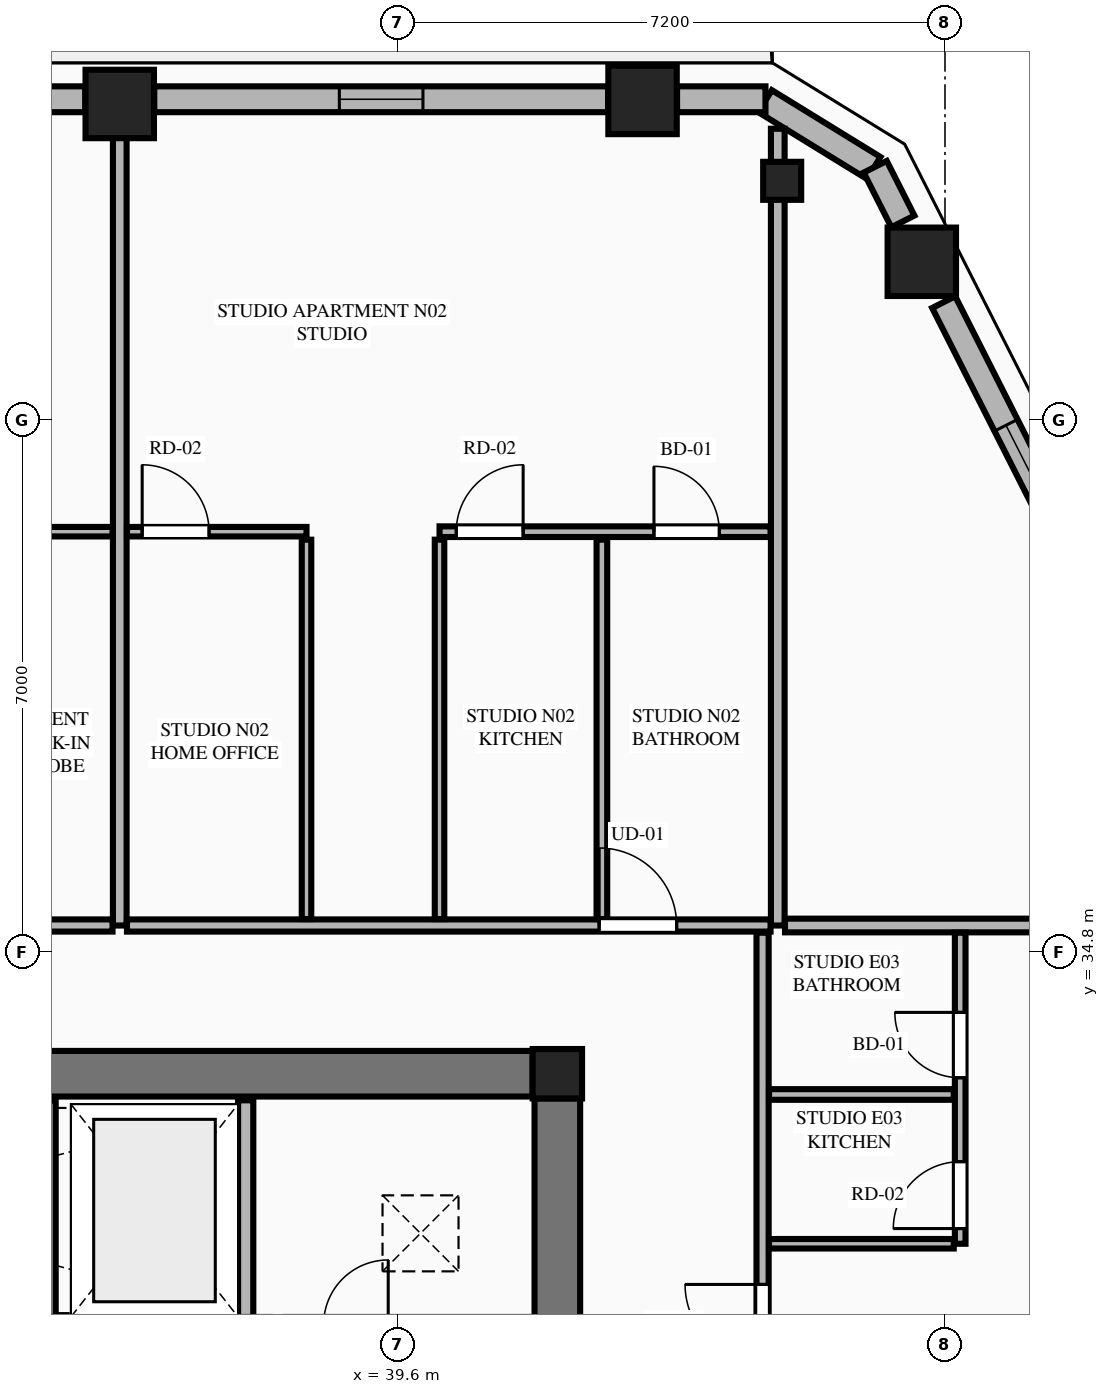
"""IFC4 building model, lengths in metres.
Left out: names, types, materials, properties, quantities, classifications, styles, units other than length and angle.
Written with IfcOpenShell. Run it as: python <this file> out.ifc"""

import sys

from ifc_helpers import new_model, si_unit, direction, frame, frame_2d, origin, origin_2d, place, context, subcontext, project, spatial, rectangle, extrude, element, fill, save


model = new_model("IFC4")
c1 = context("Model", 3, precision=1e-05, world=origin(), true_north=direction((0.0, 1.0)))
c2 = subcontext(c1, "Body", "Model", "MODEL_VIEW")
j1 = project(units=[si_unit("LENGTHUNIT", "METRE"), si_unit("PLANEANGLEUNIT", "RADIAN")], contexts=[c1])
p1 = place(None, origin())
s1 = spatial("IfcSite", under=j1, at=p1, CompositionType="ELEMENT")
p2 = place(p1, origin())
s2 = spatial("IfcBuilding", under=s1, at=p2, CompositionType="ELEMENT")
p3 = place(p2, frame((0.0, 0.0, 203.85)))
s3 = spatial("IfcBuildingStorey", under=s2, at=p3, CompositionType="ELEMENT", Elevation=203.85)
p4 = place(p3, frame((41.7, 33.2, 0.0), z_axis=(0.0, 0.0, 1.0), x_axis=(1.0, 0.0, 0.0)))
e1 = element("IfcColumn", 1, at=p4, inside=s3, PredefinedType="COLUMN", context=c2, shape_type="SweptSolid", body=[
    extrude(rectangle(XDim=0.65, YDim=0.65, at=origin_2d()), origin(), (0.0, 0.0, 1.0), 3.55),
])
p5 = place(p3, frame((23.425, 33.2, 0.0), z_axis=(0.0, 0.0, 1.0), x_axis=(1.0, 0.0, 0.0)))
e2 = element("IfcWall", 2, at=p5, inside=s3, PredefinedType="SHEAR", context=c2, shape_type="SweptSolid", body=[
    extrude(rectangle(XDim=17.95, YDim=0.6, at=frame_2d((8.975, 0.0))), origin(), (0.0, 0.0, 1.0), 3.35),
])
p6 = place(p3, frame((41.7, 18.925, 0.0), z_axis=(0.0, 0.0, 1.0), x_axis=(0.0, 1.0, 0.0)))
e3 = element("IfcWall", 3, at=p6, inside=s3, PredefinedType="SHEAR", context=c2, shape_type="SweptSolid", body=[
    extrude(rectangle(XDim=13.95, YDim=0.6, at=frame_2d((6.975, 0.0))), origin(), (0.0, 0.0, 1.0), 3.35),
])
p7 = place(p6, frame((2.915, 0.0, 0.0)))
e4 = element("IfcOpeningElement", 4, at=p7, cuts=e3, PredefinedType="OPENING", context=c2, shape_type="SweptSolid", body=[
    extrude(rectangle(XDim=1.22, YDim=2.25, at=frame_2d((0.61, 1.125))), frame((0.0, 0.31, 0.0), z_axis=(0.0, -1.0, 0.0), x_axis=(1.0, 0.0, 0.0)), (0.0, 0.0, 1.0), 0.62),
])
for number, where, z_axis, x_axis in (
    (5, (46.495, 43.882, 0.0), (0.0, 0.0, 1.0), (1.0, 0.0, 0.0)),
    (6, (42.821, 46.011, 0.0), (0.0, 0.0, 1.0), (1.0, 0.0, 0.0)),
    (7, (35.943, 45.958, 0.0), (0.0, 0.0, 1.0), (1.0, 0.0, 0.0)),
):
    element("IfcColumn", number, at=place(p3, frame(where, z_axis=z_axis, x_axis=x_axis)), inside=s3, PredefinedType="COLUMN", context=c2, shape_type="SweptSolid", body=[
        extrude(rectangle(XDim=0.9, YDim=0.9, at=origin_2d()), origin(), (0.0, 0.0, 1.0), 3.55),
    ])
p8 = place(p3, frame((44.658, 44.947, 0.0), z_axis=(0.0, 0.0, 1.0), x_axis=(-0.865230187018, 0.501374833306, 0.0)))
e8 = element("IfcColumn", 8, at=p8, inside=s3, PredefinedType="PILASTER", context=c2, shape_type="SweptSolid", body=[
    extrude(rectangle(XDim=0.5, YDim=0.35, at=origin_2d()), origin(), (0.0, 0.0, 1.0), 3.55),
])
for number, where, z_axis, x_axis in (
    (9, (35.0, 30.0, 0.0), (0.0, 0.0, 1.0), (0.0, 1.0, 0.0)),
    (10, (37.6, 30.0, 0.0), (0.0, 0.0, 1.0), (0.0, 1.0, 0.0)),
):
    element("IfcWall", number, at=place(p3, frame(where, z_axis=z_axis, x_axis=x_axis)), inside=s3, PredefinedType="PLUMBINGWALL", context=c2, shape_type="SweptSolid", body=[
        extrude(rectangle(XDim=2.85, YDim=0.2, at=frame_2d((1.425, 0.0))), origin(), (0.0, 0.0, 1.0), 3.35),
    ])
p9 = place(p3, frame((45.862, 45.116, 0.0), z_axis=(0.0, 0.0, 1.0), x_axis=(-0.851713271379, 0.524008113828, 0.0)))
e11 = element("IfcWall", 11, at=p9, inside=s3, PredefinedType="STANDARD", context=c2, shape_type="SweptSolid", body=[
    extrude(rectangle(XDim=1.678, YDim=0.34, at=frame_2d((0.839, 0.0))), origin(), (0.0, 0.0, 1.0), 3.35),
])
p10 = place(p3, frame((48.919, 39.13, 0.0), z_axis=(0.0, 0.0, 1.0), x_axis=(-0.45150207307, 0.892270070109, 0.0)))
e12 = element("IfcWall", 12, at=p10, inside=s3, PredefinedType="STANDARD", context=c2, shape_type="SweptSolid", body=[
    extrude(rectangle(XDim=4.731, YDim=0.34, at=frame_2d((2.365, 0.0))), origin(), (0.0, 0.0, 1.0), 2.883),
])
p11 = place(p10, frame((1.815, 0.0, 0.75)))
e13 = element("IfcOpeningElement", 13, at=p11, cuts=e12, PredefinedType="OPENING", context=c2, shape_type="SweptSolid", body=[
    extrude(rectangle(XDim=1.1, YDim=1.983, at=frame_2d((0.55, 0.991))), frame((0.0, 0.18, 0.0), z_axis=(0.0, -1.0, 0.0), x_axis=(1.0, 0.0, 0.0)), (0.0, 0.0, 1.0), 0.36),
])
p12 = place(p3, frame((46.246, 44.413, 0.0), z_axis=(0.0, 0.0, 1.0), x_axis=(-0.451691568309, 0.892174157392, 0.0)))
e14 = element("IfcWall", 14, at=p12, inside=s3, PredefinedType="STANDARD", context=c2, shape_type="SweptSolid", body=[
    extrude(rectangle(XDim=0.806, YDim=0.34, at=frame_2d((0.403, 0.0))), origin(), (0.0, 0.0, 1.0), 3.35),
])
p13 = place(p3, frame((44.438, 46.02, 0.0), z_axis=(0.0, 0.0, 1.0), x_axis=(-1.0, 0.0, 0.0)))
e15 = element("IfcWall", 15, at=p13, inside=s3, PredefinedType="STANDARD", context=c2, shape_type="SweptSolid", body=[
    extrude(rectangle(XDim=1.163, YDim=0.34, at=frame_2d((0.582, 0.0))), origin(), (0.0, 0.0, 1.0), 3.35),
])
p14 = place(p3, frame((42.367, 46.02, 0.0), z_axis=(0.0, 0.0, 1.0), x_axis=(-1.0, 0.0, 0.0)))
e16 = element("IfcWall", 16, at=p14, inside=s3, PredefinedType="STANDARD", context=c2, shape_type="SweptSolid", body=[
    extrude(rectangle(XDim=5.97, YDim=0.34, at=frame_2d((2.985, 0.0))), origin(), (0.0, 0.0, 1.0), 2.883),
])
p15 = place(p14, frame((2.435, 0.0, 0.75)))
e17 = element("IfcOpeningElement", 17, at=p15, cuts=e16, PredefinedType="OPENING", context=c2, shape_type="SweptSolid", body=[
    extrude(rectangle(XDim=1.1, YDim=1.983, at=frame_2d((0.55, 0.991))), frame((0.0, 0.18, 0.0), z_axis=(0.0, -1.0, 0.0), x_axis=(1.0, 0.0, 0.0)), (0.0, 0.0, 1.0), 0.36),
])
p16 = place(p3, frame((35.489, 46.02, 0.0), z_axis=(0.0, 0.0, 1.0), x_axis=(-1.0, 0.0, 0.0)))
e18 = element("IfcWall", 18, at=p16, inside=s3, PredefinedType="STANDARD", context=c2, shape_type="SweptSolid", body=[
    extrude(rectangle(XDim=6.178, YDim=0.34, at=frame_2d((3.089, 0.0))), origin(), (0.0, 0.0, 1.0), 2.883),
])
p17 = place(p16, frame((1.668, 0.0, 0.0)))
e19 = element("IfcOpeningElement", 19, at=p17, cuts=e18, PredefinedType="OPENING", context=c2, shape_type="SweptSolid", body=[
    extrude(rectangle(XDim=1.1, YDim=2.25, at=frame_2d((0.55, 1.125))), frame((0.0, 0.18, 0.0), z_axis=(0.0, -1.0, 0.0), x_axis=(1.0, 0.0, 0.0)), (0.0, 0.0, 1.0), 0.36),
])
p18 = place(p16, frame((4.872, 0.0, 0.75)))
e20 = element("IfcOpeningElement", 20, at=p18, cuts=e18, PredefinedType="OPENING", context=c2, shape_type="SweptSolid", body=[
    extrude(rectangle(XDim=1.086, YDim=1.983, at=frame_2d((0.543, 0.991))), frame((0.0, 0.18, 0.0), z_axis=(0.0, -1.0, 0.0), x_axis=(1.0, 0.0, 0.0)), (0.0, 0.0, 1.0), 0.36),
])
p19 = place(p3, frame((35.943, 35.15, 0.0), z_axis=(0.0, 0.0, 1.0), x_axis=(0.0, 1.0, 0.0)))
e21 = element("IfcWall", 21, at=p19, inside=s3, PredefinedType="PARTITIONING", context=c2, shape_type="SweptSolid", body=[
    extrude(rectangle(XDim=10.695, YDim=0.18, at=frame_2d((5.348, 0.0))), origin(), (0.0, 0.0, 1.0), 2.807),
])
p20 = place(p3, frame((44.6, 35.15, 0.0), z_axis=(0.0, 0.0, 1.0), x_axis=(0.0, 1.0, 0.0)))
e22 = element("IfcWall", 22, at=p20, inside=s3, PredefinedType="PARTITIONING", context=c2, shape_type="SweptSolid", body=[
    extrude(rectangle(XDim=10.482, YDim=0.18, at=frame_2d((5.241, 0.0))), origin(), (0.0, 0.0, 1.0), 3.35),
])
p21 = place(p3, frame((20.295, 35.15, 0.0), z_axis=(0.0, 0.0, 1.0), x_axis=(1.0, 0.0, 0.0)))
e23 = element("IfcWall", 23, at=p21, inside=s3, PredefinedType="PARTITIONING", context=c2, shape_type="SweptSolid", body=[
    extrude(rectangle(XDim=15.553, YDim=0.16, at=frame_2d((7.776, 0.0))), origin(), (0.0, 0.0, 1.0), 3.35),
])
p22 = place(p21, frame((0.405, 0.0, 0.0)))
e24 = element("IfcOpeningElement", 24, at=p22, cuts=e23, PredefinedType="OPENING", context=c2, shape_type="SweptSolid", body=[
    extrude(rectangle(XDim=1.02, YDim=2.25, at=frame_2d((0.51, 1.125))), frame((0.0, 0.09, 0.0), z_axis=(0.0, -1.0, 0.0), x_axis=(1.0, 0.0, 0.0)), (0.0, 0.0, 1.0), 0.18),
])
p23 = place(p3, frame((30.95, 40.331, 0.0), z_axis=(0.0, 0.0, 1.0), x_axis=(1.0, 0.0, 0.0)))
e25 = element("IfcWall", 25, at=p23, inside=s3, PredefinedType="PARTITIONING", context=c2, shape_type="SweptSolid", body=[
    extrude(rectangle(XDim=4.898, YDim=0.125, at=frame_2d((2.449, 0.0))), origin(), (0.0, 0.0, 1.0), 3.35),
])
p24 = place(p23, frame((0.28, 0.0, 0.0)))
e26 = element("IfcOpeningElement", 26, at=p24, cuts=e25, PredefinedType="OPENING", context=c2, shape_type="SweptSolid", body=[
    extrude(rectangle(XDim=0.86, YDim=2.1, at=frame_2d((0.43, 1.05))), frame((0.0, 0.073, 0.0), z_axis=(0.0, -1.0, 0.0), x_axis=(1.0, 0.0, 0.0)), (0.0, 0.0, 1.0), 0.145),
])
p25 = place(p23, frame((3.028, 0.0, 0.0)))
e27 = element("IfcOpeningElement", 27, at=p25, cuts=e25, PredefinedType="OPENING", context=c2, shape_type="SweptSolid", body=[
    extrude(rectangle(XDim=0.88, YDim=2.15, at=frame_2d((0.44, 1.075))), frame((0.0, 0.073, 0.0), z_axis=(0.0, -1.0, 0.0), x_axis=(1.0, 0.0, 0.0)), (0.0, 0.0, 1.0), 0.145),
])
p26 = place(p3, frame((36.038, 35.15, 0.0), z_axis=(0.0, 0.0, 1.0), x_axis=(1.0, 0.0, 0.0)))
e28 = element("IfcWall", 28, at=p26, inside=s3, PredefinedType="PARTITIONING", context=c2, shape_type="SweptSolid", body=[
    extrude(rectangle(XDim=8.467, YDim=0.16, at=frame_2d((4.233, 0.0))), origin(), (0.0, 0.0, 1.0), 3.35),
])
p27 = place(p26, frame((6.212, 0.0, 0.0)))
e29 = element("IfcOpeningElement", 29, at=p27, cuts=e28, PredefinedType="OPENING", context=c2, shape_type="SweptSolid", body=[
    extrude(rectangle(XDim=1.02, YDim=2.25, at=frame_2d((0.51, 1.125))), frame((0.0, 0.09, 0.0), z_axis=(0.0, -1.0, 0.0), x_axis=(1.0, 0.0, 0.0)), (0.0, 0.0, 1.0), 0.18),
])
p28 = place(p3, frame((40.15, 35.235, 0.0), z_axis=(0.0, 0.0, 1.0), x_axis=(0.0, 1.0, 0.0)))
e30 = element("IfcWall", 30, at=p28, inside=s3, PredefinedType="PARTITIONING", context=c2, shape_type="SweptSolid", body=[
    extrude(rectangle(XDim=4.991, YDim=0.125, at=frame_2d((2.496, 0.0))), origin(), (0.0, 0.0, 1.0), 3.35),
])
p29 = place(p3, frame((40.15, 40.331, 0.0), z_axis=(0.0, 0.0, 1.0), x_axis=(1.0, 0.0, 0.0)))
e31 = element("IfcWall", 31, at=p29, inside=s3, PredefinedType="PLUMBINGWALL", context=c2, shape_type="SweptSolid", body=[
    extrude(rectangle(XDim=4.355, YDim=0.14, at=frame_2d((2.177, 0.0))), origin(), (0.0, 0.0, 1.0), 3.35),
])
p30 = place(p29, frame((2.821, 0.0, 0.0)))
e32 = element("IfcOpeningElement", 32, at=p30, cuts=e31, PredefinedType="OPENING", context=c2, shape_type="SweptSolid", body=[
    extrude(rectangle(XDim=0.86, YDim=2.1, at=frame_2d((0.43, 1.05))), frame((0.0, 0.08, 0.0), z_axis=(0.0, -1.0, 0.0), x_axis=(1.0, 0.0, 0.0)), (0.0, 0.0, 1.0), 0.16),
])
p31 = place(p29, frame((0.22, 0.0, 0.0)))
e33 = element("IfcOpeningElement", 33, at=p31, cuts=e31, PredefinedType="OPENING", context=c2, shape_type="SweptSolid", body=[
    extrude(rectangle(XDim=0.88, YDim=2.15, at=frame_2d((0.44, 1.075))), frame((0.0, 0.08, 0.0), z_axis=(0.0, -1.0, 0.0), x_axis=(1.0, 0.0, 0.0)), (0.0, 0.0, 1.0), 0.16),
])
p32 = place(p3, frame((42.286, 35.235, 0.0), z_axis=(0.0, 0.0, 1.0), x_axis=(0.0, 1.0, 0.0)))
e34 = element("IfcWall", 34, at=p32, inside=s3, PredefinedType="PLUMBINGWALL", context=c2, shape_type="SweptSolid", body=[
    extrude(rectangle(XDim=4.991, YDim=0.14, at=frame_2d((2.496, 0.0))), origin(), (0.0, 0.0, 1.0), 2.807),
])
p33 = place(p3, frame((38.4, 35.235, 0.0), z_axis=(0.0, 0.0, 1.0), x_axis=(0.0, 1.0, 0.0)))
e35 = element("IfcWall", 35, at=p33, inside=s3, PredefinedType="PARTITIONING", context=c2, shape_type="SweptSolid", body=[
    extrude(rectangle(XDim=4.991, YDim=0.125, at=frame_2d((2.496, 0.0))), origin(), (0.0, 0.0, 1.0), 3.35),
])
p34 = place(p3, frame((36.038, 40.331, 0.0), z_axis=(0.0, 0.0, 1.0), x_axis=(1.0, 0.0, 0.0)))
e36 = element("IfcWall", 36, at=p34, inside=s3, PredefinedType="PARTITIONING", context=c2, shape_type="SweptSolid", body=[
    extrude(rectangle(XDim=2.362, YDim=0.125, at=frame_2d((1.181, 0.0))), origin(), (0.0, 0.0, 1.0), 3.35),
])
p35 = place(p34, frame((0.2, 0.0, 0.0)))
e37 = element("IfcOpeningElement", 37, at=p35, cuts=e36, PredefinedType="OPENING", context=c2, shape_type="SweptSolid", body=[
    extrude(rectangle(XDim=0.88, YDim=2.15, at=frame_2d((0.44, 1.075))), frame((0.0, 0.073, 0.0), z_axis=(0.0, -1.0, 0.0), x_axis=(1.0, 0.0, 0.0)), (0.0, 0.0, 1.0), 0.145),
])
p36 = place(p3, frame((44.695, 35.15, 0.0), z_axis=(0.0, 0.0, 1.0), x_axis=(1.0, 0.0, 0.0)))
e38 = element("IfcWall", 38, at=p36, inside=s3, PredefinedType="PARTITIONING", context=c2, shape_type="SweptSolid", body=[
    extrude(rectangle(XDim=5.995, YDim=0.18, at=frame_2d((2.998, 0.0))), origin(), (0.0, 0.0, 1.0), 3.35),
])
p37 = place(p3, frame((44.4, 29.008, 0.0), z_axis=(0.0, 0.0, 1.0), x_axis=(0.0, 1.0, 0.0)))
e39 = element("IfcWall", 39, at=p37, inside=s3, PredefinedType="PARTITIONING", context=c2, shape_type="SweptSolid", body=[
    extrude(rectangle(XDim=6.047, YDim=0.16, at=frame_2d((3.023, 0.0))), origin(), (0.0, 0.0, 1.0), 3.35),
])
p38 = place(p37, frame((0.4, 0.0, 0.0)))
e40 = element("IfcOpeningElement", 40, at=p38, cuts=e39, PredefinedType="OPENING", context=c2, shape_type="SweptSolid", body=[
    extrude(rectangle(XDim=1.02, YDim=2.25, at=frame_2d((0.51, 1.125))), frame((0.0, 0.09, 0.0), z_axis=(0.0, -1.0, 0.0), x_axis=(1.0, 0.0, 0.0)), (0.0, 0.0, 1.0), 0.18),
])
p39 = place(p3, frame((44.485, 30.963, 0.0), z_axis=(0.0, 0.0, 1.0), x_axis=(1.0, 0.0, 0.0)))
e41 = element("IfcWall", 41, at=p39, inside=s3, PredefinedType="PARTITIONING", context=c2, shape_type="SweptSolid", body=[
    extrude(rectangle(XDim=2.43, YDim=0.125, at=frame_2d((1.215, 0.0))), origin(), (0.0, 0.0, 1.0), 3.35),
])
p40 = place(p3, frame((47.0, 30.963, 0.0), z_axis=(0.0, 0.0, 1.0), x_axis=(0.0, 1.0, 0.0)))
e42 = element("IfcWall", 42, at=p40, inside=s3, PredefinedType="PLUMBINGWALL", context=c2, shape_type="SweptSolid", body=[
    extrude(rectangle(XDim=4.092, YDim=0.14, at=frame_2d((2.046, 0.0))), origin(), (0.0, 0.0, 1.0), 3.35),
])
p41 = place(p40, frame((2.184, 0.0, 0.0)))
e43 = element("IfcOpeningElement", 43, at=p41, cuts=e42, PredefinedType="OPENING", context=c2, shape_type="SweptSolid", body=[
    extrude(rectangle(XDim=0.86, YDim=2.1, at=frame_2d((0.43, 1.05))), frame((0.0, 0.08, 0.0), z_axis=(0.0, -1.0, 0.0), x_axis=(1.0, 0.0, 0.0)), (0.0, 0.0, 1.0), 0.16),
])
p42 = place(p40, frame((0.2, 0.0, 0.0)))
e44 = element("IfcOpeningElement", 44, at=p42, cuts=e42, PredefinedType="OPENING", context=c2, shape_type="SweptSolid", body=[
    extrude(rectangle(XDim=0.88, YDim=2.15, at=frame_2d((0.44, 1.075))), frame((0.0, 0.08, 0.0), z_axis=(0.0, -1.0, 0.0), x_axis=(1.0, 0.0, 0.0)), (0.0, 0.0, 1.0), 0.16),
])
p43 = place(p3, frame((44.485, 32.927, 0.0), z_axis=(0.0, 0.0, 1.0), x_axis=(1.0, 0.0, 0.0)))
e45 = element("IfcWall", 45, at=p43, inside=s3, PredefinedType="PLUMBINGWALL", context=c2, shape_type="SweptSolid", body=[
    extrude(rectangle(XDim=2.43, YDim=0.14, at=frame_2d((1.215, 0.0))), origin(), (0.0, 0.0, 1.0), 3.35),
])
p44 = place(p11, origin())
e46 = element("IfcWindow", 46, at=p44, inside=s3, PartitioningType="SINGLE_PANEL", PredefinedType="WINDOW", context=c2, shape_type="SweptSolid", body=[
    extrude(rectangle(XDim=1.1, YDim=1.983, at=frame_2d((0.55, 0.991))), frame((0.0, 0.03, 0.0), z_axis=(0.0, -1.0, 0.0), x_axis=(1.0, 0.0, 0.0)), (0.0, 0.0, 1.0), 0.06),
])
fill(e13, e46)
p45 = place(p15, origin())
e47 = element("IfcWindow", 47, at=p45, inside=s3, PartitioningType="SINGLE_PANEL", PredefinedType="WINDOW", context=c2, shape_type="SweptSolid", body=[
    extrude(rectangle(XDim=1.1, YDim=1.983, at=frame_2d((0.55, 0.991))), frame((0.0, 0.03, 0.0), z_axis=(0.0, -1.0, 0.0), x_axis=(1.0, 0.0, 0.0)), (0.0, 0.0, 1.0), 0.06),
])
fill(e17, e47)
p46 = place(p35, origin())
e48 = element("IfcDoor", 48, at=p46, inside=s3, OperationType="SINGLE_SWING_LEFT", PredefinedType="DOOR", context=c2, shape_type="SweptSolid", body=[
    extrude(rectangle(XDim=0.88, YDim=2.15, at=frame_2d((0.44, 1.075))), frame((0.0, 0.025, 0.0), z_axis=(0.0, -1.0, 0.0), x_axis=(1.0, 0.0, 0.0)), (0.0, 0.0, 1.0), 0.05),
])
fill(e37, e48)
p47 = place(p30, origin())
e49 = element("IfcDoor", 49, at=p47, inside=s3, OperationType="SINGLE_SWING_LEFT", PredefinedType="DOOR", context=c2, shape_type="SweptSolid", body=[
    extrude(rectangle(XDim=0.86, YDim=2.1, at=frame_2d((0.43, 1.05))), frame((0.0, 0.025, 0.0), z_axis=(0.0, -1.0, 0.0), x_axis=(1.0, 0.0, 0.0)), (0.0, 0.0, 1.0), 0.05),
])
fill(e32, e49)
p48 = place(p27, origin())
e50 = element("IfcDoor", 50, at=p48, inside=s3, OperationType="SINGLE_SWING_LEFT", PredefinedType="DOOR", context=c2, shape_type="SweptSolid", body=[
    extrude(rectangle(XDim=1.02, YDim=2.25, at=frame_2d((0.51, 1.125))), frame((0.0, 0.025, 0.0), z_axis=(0.0, -1.0, 0.0), x_axis=(1.0, 0.0, 0.0)), (0.0, 0.0, 1.0), 0.05),
])
fill(e29, e50)
p49 = place(p31, origin())
e51 = element("IfcDoor", 51, at=p49, inside=s3, OperationType="SINGLE_SWING_RIGHT", PredefinedType="DOOR", context=c2, shape_type="SweptSolid", body=[
    extrude(rectangle(XDim=0.88, YDim=2.15, at=frame_2d((0.44, 1.075))), frame((0.0, 0.025, 0.0), z_axis=(0.0, -1.0, 0.0), x_axis=(1.0, 0.0, 0.0)), (0.0, 0.0, 1.0), 0.05),
])
fill(e33, e51)
p50 = place(p41, origin())
e52 = element("IfcDoor", 52, at=p50, inside=s3, OperationType="SINGLE_SWING_RIGHT", PredefinedType="DOOR", context=c2, shape_type="SweptSolid", body=[
    extrude(rectangle(XDim=0.86, YDim=2.1, at=frame_2d((0.43, 1.05))), frame((0.0, 0.025, 0.0), z_axis=(0.0, -1.0, 0.0), x_axis=(1.0, 0.0, 0.0)), (0.0, 0.0, 1.0), 0.05),
])
fill(e43, e52)
p51 = place(p38, origin())
e53 = element("IfcDoor", 53, at=p51, inside=s3, OperationType="SINGLE_SWING_RIGHT", PredefinedType="DOOR", context=c2, shape_type="SweptSolid", body=[
    extrude(rectangle(XDim=1.02, YDim=2.25, at=frame_2d((0.51, 1.125))), frame((0.0, 0.025, 0.0), z_axis=(0.0, -1.0, 0.0), x_axis=(1.0, 0.0, 0.0)), (0.0, 0.0, 1.0), 0.05),
])
fill(e40, e53)
p52 = place(p42, origin())
e54 = element("IfcDoor", 54, at=p52, inside=s3, OperationType="SINGLE_SWING_LEFT", PredefinedType="DOOR", context=c2, shape_type="SweptSolid", body=[
    extrude(rectangle(XDim=0.88, YDim=2.15, at=frame_2d((0.44, 1.075))), frame((0.0, 0.025, 0.0), z_axis=(0.0, -1.0, 0.0), x_axis=(1.0, 0.0, 0.0)), (0.0, 0.0, 1.0), 0.05),
])
fill(e44, e54)
save(model, sys.argv[1])
